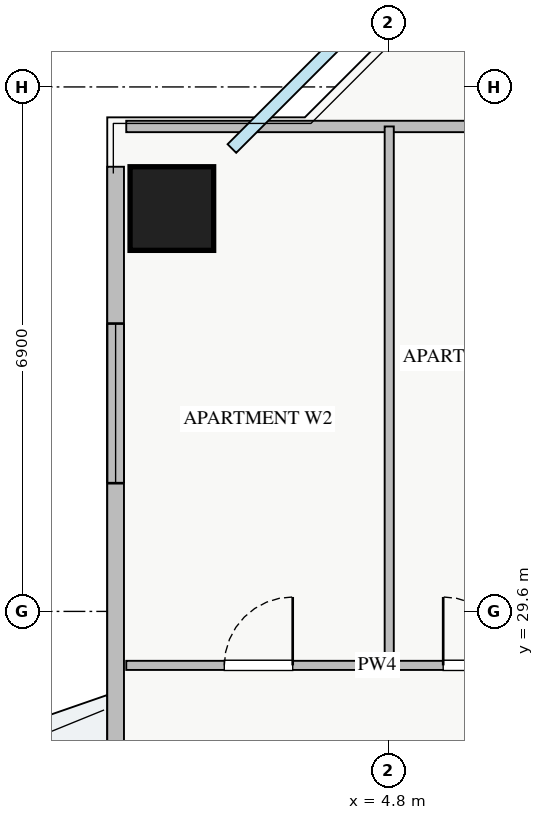
"""IFC4 building model, lengths in metres.
Left out: names, types, materials, properties, quantities, classifications, styles, units other than length and angle.
Written with IfcOpenShell. Run it as: python <this file> out.ifc"""

import sys

from ifc_helpers import new_model, si_unit, direction, frame, frame_2d, origin, origin_2d, place, context, subcontext, project, spatial, rectangle, extrude, source, transform, mapped, element, fill, save


model = new_model("IFC4")
c1 = context("Model", 3, precision=1e-05, world=origin(), true_north=direction((0.0, 1.0)))
c2 = subcontext(c1, "Body", "Model", "MODEL_VIEW")
j1 = project(units=[si_unit("LENGTHUNIT", "METRE"), si_unit("PLANEANGLEUNIT", "RADIAN")], contexts=[c1])
p1 = place(None, origin())
s1 = spatial("IfcSite", under=j1, at=p1, CompositionType="ELEMENT")
p2 = place(p1, origin())
s2 = spatial("IfcBuilding", under=s1, at=p2, CompositionType="ELEMENT")
p3 = place(p2, frame((0.0, 0.0, 119.75)))
s3 = spatial("IfcBuildingStorey", under=s2, at=p3, CompositionType="ELEMENT", Elevation=119.75)
m1 = source(origin(), c2, "Body", "SweptSolid", [
    extrude(rectangle(XDim=1.1, YDim=1.1, at=origin_2d()), origin(), (0.0, 0.0, 1.0), 3.25),
])
p4 = place(p3, frame((1.95, 34.9, 0.0), z_axis=(0.0, 0.0, 1.0), x_axis=(1.0, 0.0, 0.0)))
e1 = element("IfcColumn", 1, at=p4, inside=s3, PredefinedType="COLUMN", context=c2, shape_type="MappedRepresentation", body=[
    mapped(m1, transform((0.0, 0.0, 0.0), x_axis=(1.0, 0.0, 0.0), y_axis=(0.0, 1.0, 0.0), z_axis=(0.0, 0.0, 1.0), scale=1.0)),
])
p5 = place(p3, frame((1.21, 10.55, 0.0), z_axis=(0.0, 0.0, 1.0), x_axis=(0.0, 1.0, 0.0)))
e2 = element("IfcWall", 2, at=p5, inside=s3, PredefinedType="STANDARD", context=c2, shape_type="SweptSolid", body=[
    extrude(rectangle(XDim=24.9, YDim=0.22, at=frame_2d((12.45, 0.0))), origin(), (0.0, 0.0, 1.0), 2.61),
])
p6 = place(p5, frame((13.3, 0.0, 0.0)))
e3 = element("IfcOpeningElement", 3, at=p6, cuts=e2, PredefinedType="OPENING", context=c2, shape_type="SweptSolid", body=[
    extrude(rectangle(XDim=1.2, YDim=2.1, at=frame_2d((0.6, 1.05))), frame((0.0, 0.12, 0.0), z_axis=(0.0, -1.0, 0.0), x_axis=(1.0, 0.0, 0.0)), (0.0, 0.0, 1.0), 0.24),
])
p7 = place(p5, frame((1.912, 0.0, 0.9)))
e4 = element("IfcOpeningElement", 4, at=p7, cuts=e2, PredefinedType="OPENING", context=c2, shape_type="SweptSolid", body=[
    extrude(rectangle(XDim=2.4, YDim=1.48, at=frame_2d((1.2, 0.74))), frame((0.0, 0.12, 0.0), z_axis=(0.0, -1.0, 0.0), x_axis=(1.0, 0.0, 0.0)), (0.0, 0.0, 1.0), 0.24),
])
p8 = place(p5, frame((20.737, 0.0, 0.9)))
e5 = element("IfcOpeningElement", 5, at=p8, cuts=e2, PredefinedType="OPENING", context=c2, shape_type="SweptSolid", body=[
    extrude(rectangle(XDim=2.1, YDim=1.48, at=frame_2d((1.05, 0.74))), frame((0.0, 0.12, 0.0), z_axis=(0.0, -1.0, 0.0), x_axis=(1.0, 0.0, 0.0)), (0.0, 0.0, 1.0), 0.24),
])
p9 = place(p5, frame((12.025, 0.0, 0.9)))
e6 = element("IfcOpeningElement", 6, at=p9, cuts=e2, PredefinedType="OPENING", context=c2, shape_type="SweptSolid", body=[
    extrude(rectangle(XDim=0.9, YDim=1.2, at=frame_2d((0.45, 0.6))), frame((0.0, 0.12, 0.0), z_axis=(0.0, -1.0, 0.0), x_axis=(1.0, 0.0, 0.0)), (0.0, 0.0, 1.0), 0.24),
])
p10 = place(p3, frame((1.35, 35.98, 0.0), z_axis=(0.0, 0.0, 1.0), x_axis=(1.0, 0.0, 0.0)))
e7 = element("IfcWall", 7, at=p10, inside=s3, PredefinedType="PARTITIONING", context=c2, shape_type="SweptSolid", body=[
    extrude(rectangle(XDim=7.5, YDim=0.15, at=frame_2d((3.75, 0.0))), origin(), (0.0, 0.0, 1.0), 3.07),
])
p11 = place(p3, frame((1.35, 28.89, 0.0), z_axis=(0.0, 0.0, 1.0), x_axis=(1.0, 0.0, 0.0)))
e8 = element("IfcWall", 8, at=p11, inside=s3, PredefinedType="PLUMBINGWALL", context=c2, shape_type="SweptSolid", body=[
    extrude(rectangle(XDim=7.5, YDim=0.12, at=frame_2d((3.75, 0.0))), origin(), (0.0, 0.0, 1.0), 3.07),
])
p12 = place(p11, frame((1.29, 0.0, 0.0)))
e9 = element("IfcOpeningElement", 9, at=p12, cuts=e8, PredefinedType="OPENING", context=c2, shape_type="SweptSolid", body=[
    extrude(rectangle(XDim=0.9, YDim=2.05, at=frame_2d((0.45, 1.025))), frame((0.0, 0.07, 0.0), z_axis=(0.0, -1.0, 0.0), x_axis=(1.0, 0.0, 0.0)), (0.0, 0.0, 1.0), 0.14),
])
p13 = place(p11, frame((4.17, 0.0, 0.0)))
e10 = element("IfcOpeningElement", 10, at=p13, cuts=e8, PredefinedType="OPENING", context=c2, shape_type="SweptSolid", body=[
    extrude(rectangle(XDim=0.9, YDim=2.05, at=frame_2d((0.45, 1.025))), frame((0.0, 0.07, 0.0), z_axis=(0.0, -1.0, 0.0), x_axis=(1.0, 0.0, 0.0)), (0.0, 0.0, 1.0), 0.14),
])
p14 = place(p11, frame((6.205, 0.0, 0.0)))
e11 = element("IfcOpeningElement", 11, at=p14, cuts=e8, PredefinedType="OPENING", context=c2, shape_type="SweptSolid", body=[
    extrude(rectangle(XDim=0.85, YDim=2.05, at=frame_2d((0.425, 1.025))), frame((0.0, 0.07, 0.0), z_axis=(0.0, -1.0, 0.0), x_axis=(1.0, 0.0, 0.0)), (0.0, 0.0, 1.0), 0.14),
])
p15 = place(p3, frame((4.81, 28.89, 0.0), z_axis=(0.0, 0.0, 1.0), x_axis=(0.0, 1.0, 0.0)))
e12 = element("IfcWall", 12, at=p15, inside=s3, PredefinedType="PLUMBINGWALL", context=c2, shape_type="SweptSolid", body=[
    extrude(rectangle(XDim=7.09, YDim=0.12, at=frame_2d((3.545, 0.0))), origin(), (0.0, 0.0, 1.0), 3.07),
])
m2 = source(origin(), c2, "Body", "SweptSolid", [
    extrude(rectangle(XDim=2.1, YDim=1.48, at=frame_2d((1.05, 0.74))), frame((0.0, 0.03, 0.0), z_axis=(0.0, -1.0, 0.0), x_axis=(1.0, 0.0, 0.0)), (0.0, 0.0, 1.0), 0.06),
])
p16 = place(p8, origin())
e13 = element("IfcWindow", 13, at=p16, inside=s3, PartitioningType="TRIPLE_PANEL_VERTICAL", PredefinedType="WINDOW", context=c2, shape_type="MappedRepresentation", body=[
    mapped(m2, transform((0.0, 0.0, 0.0), x_axis=(1.0, 0.0, 0.0), y_axis=(0.0, 1.0, 0.0), z_axis=(0.0, 0.0, 1.0), scale=1.0)),
])
fill(e5, e13)
m3 = source(origin(), c2, "Body", "SweptSolid", [
    extrude(rectangle(XDim=0.9, YDim=2.05, at=frame_2d((0.45, 1.025))), frame((0.0, 0.025, 0.0), z_axis=(0.0, -1.0, 0.0), x_axis=(1.0, 0.0, 0.0)), (0.0, 0.0, 1.0), 0.05),
])
p17 = place(p12, origin())
e14 = element("IfcDoor", 14, at=p17, inside=s3, OperationType="SINGLE_SWING_RIGHT", PredefinedType="DOOR", context=c2, shape_type="MappedRepresentation", body=[
    mapped(m3, transform((0.0, 0.0, 0.0), x_axis=(1.0, 0.0, 0.0), y_axis=(0.0, 1.0, 0.0), z_axis=(0.0, 0.0, 1.0), scale=1.0)),
])
fill(e9, e14)
p18 = place(p13, origin())
e15 = element("IfcDoor", 15, at=p18, inside=s3, OperationType="SINGLE_SWING_LEFT", PredefinedType="DOOR", context=c2, shape_type="MappedRepresentation", body=[
    mapped(m3, transform((0.0, 0.0, 0.0), x_axis=(1.0, 0.0, 0.0), y_axis=(0.0, 1.0, 0.0), z_axis=(0.0, 0.0, 1.0), scale=1.0)),
])
fill(e10, e15)
save(model, sys.argv[1])
